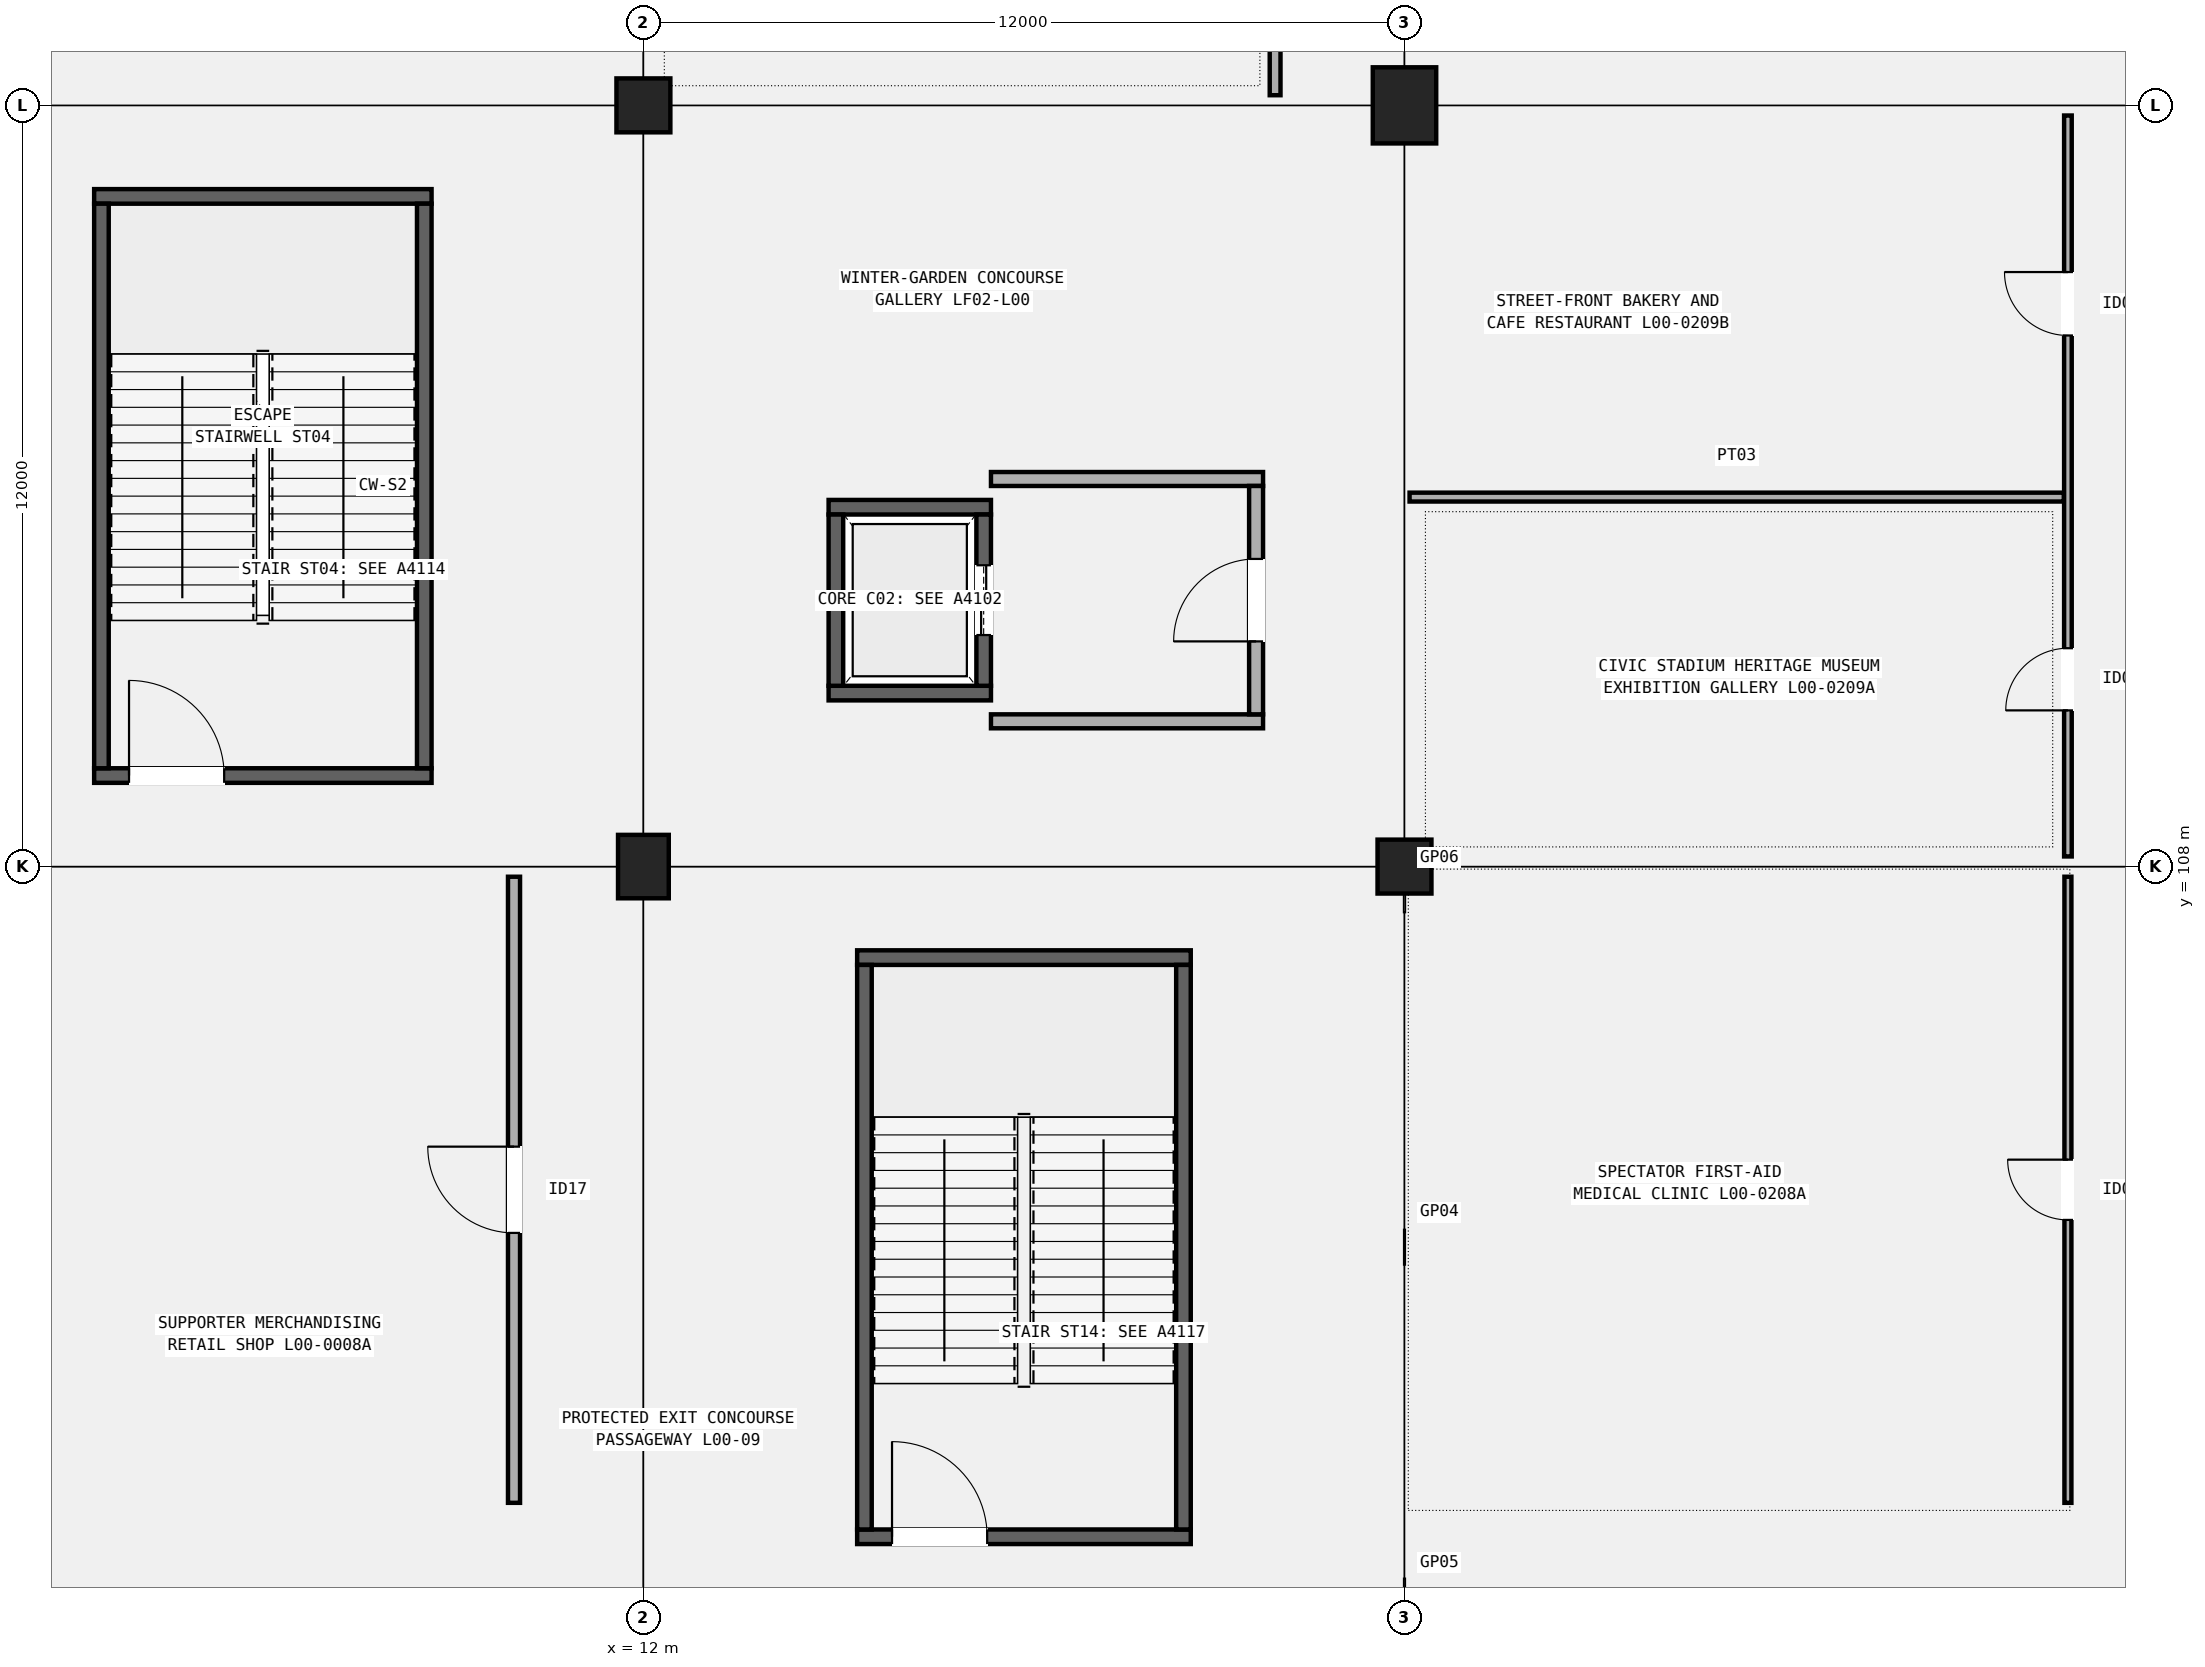
"""IFC4 building model, lengths in metres.
Left out: names, types, materials, properties, quantities, classifications, styles, units other than length and angle.
Written with IfcOpenShell. Run it as: python <this file> out.ifc"""

import sys

from ifc_helpers import new_model, si_unit, direction, frame, frame_2d, origin, origin_2d, place, context, subcontext, project, spatial, rectangle, circle, extrude, element, fill, save


model = new_model("IFC4")
c1 = context("Model", 3, precision=1e-05, world=origin(), true_north=direction((0.0, 1.0)))
c2 = subcontext(c1, "Body", "Model", "MODEL_VIEW")
j1 = project(units=[si_unit("LENGTHUNIT", "METRE"), si_unit("PLANEANGLEUNIT", "RADIAN")], contexts=[c1])
p1 = place(None, origin())
s1 = spatial("IfcSite", under=j1, at=p1, CompositionType="ELEMENT")
p2 = place(p1, origin())
s2 = spatial("IfcBuilding", under=s1, at=p2, CompositionType="ELEMENT")
p3 = place(p2, origin())
s3 = spatial("IfcBuildingStorey", under=s2, at=p3, CompositionType="ELEMENT", Elevation=0.0)
p4 = place(p3, frame((12.0, 108.0, 0.0), z_axis=(0.0, 0.0, 1.0), x_axis=(1.0, 0.0, 0.0)))
e1 = element("IfcColumn", 1, at=p4, inside=s3, PredefinedType="COLUMN", context=c2, shape_type="SweptSolid", body=[
    extrude(rectangle(XDim=0.8, YDim=1.0, at=origin_2d()), origin(), (0.0, 0.0, 1.0), 5.4),
])
for number, where, z_axis, x_axis in (
    (2, (12.0, 120.0, 0.0), (0.0, 0.0, 1.0), (1.0, 0.0, 0.0)),
    (3, (24.0, 108.0, 0.0), (0.0, 0.0, 1.0), (1.0, 0.0, 0.0)),
):
    element("IfcColumn", number, at=place(p3, frame(where, z_axis=z_axis, x_axis=x_axis)), inside=s3, PredefinedType="COLUMN", context=c2, shape_type="SweptSolid", body=[
        extrude(circle(Radius=0.425, at=origin_2d()), origin(), (0.0, 0.0, 1.0), 5.4),
    ])
p5 = place(p3, frame((24.0, 120.0, 0.0), z_axis=(0.0, 0.0, 1.0), x_axis=(1.0, 0.0, 0.0)))
e4 = element("IfcColumn", 4, at=p5, inside=s3, PredefinedType="COLUMN", context=c2, shape_type="SweptSolid", body=[
    extrude(rectangle(XDim=1.0, YDim=1.2, at=origin_2d()), origin(), (0.0, 0.0, 1.0), 5.4),
])
p6 = place(p3, frame((3.34, 109.435, 0.0), z_axis=(0.0, 0.0, 1.0), x_axis=(1.0, 0.0, 0.0)))
e5 = element("IfcWall", 5, at=p6, inside=s3, PredefinedType="SHEAR", context=c2, shape_type="SweptSolid", body=[
    extrude(rectangle(XDim=5.32, YDim=0.23, at=frame_2d((2.66, 0.0))), origin(), (0.0, 0.0, 1.0), 5.14),
])
p7 = place(p6, frame((0.55, 0.0, 0.0)))
e6 = element("IfcOpeningElement", 6, at=p7, cuts=e5, PredefinedType="OPENING", context=c2, shape_type="SweptSolid", body=[
    extrude(rectangle(XDim=1.5, YDim=2.2, at=frame_2d((0.75, 1.1))), frame((0.0, 0.125, 0.0), z_axis=(0.0, -1.0, 0.0), x_axis=(1.0, 0.0, 0.0)), (0.0, 0.0, 1.0), 0.25),
])
p8 = place(p3, frame((3.34, 118.565, 0.0), z_axis=(0.0, 0.0, 1.0), x_axis=(1.0, 0.0, 0.0)))
e7 = element("IfcWall", 7, at=p8, inside=s3, PredefinedType="SHEAR", context=c2, shape_type="SweptSolid", body=[
    extrude(rectangle(XDim=5.32, YDim=0.23, at=frame_2d((2.66, 0.0))), origin(), (0.0, 0.0, 1.0), 5.14),
])
for number, where, z_axis, x_axis in (
    (8, (3.455, 109.55, 0.0), (0.0, 0.0, 1.0), (0.0, 1.0, 0.0)),
    (9, (8.545, 109.55, 0.0), (0.0, 0.0, 1.0), (0.0, 1.0, 0.0)),
):
    element("IfcWall", number, at=place(p3, frame(where, z_axis=z_axis, x_axis=x_axis)), inside=s3, PredefinedType="SHEAR", context=c2, shape_type="SweptSolid", body=[
        extrude(rectangle(XDim=8.9, YDim=0.23, at=frame_2d((4.45, 0.0))), origin(), (0.0, 0.0, 1.0), 5.14),
    ])
p9 = place(p3, frame((15.37, 97.435, 0.0), z_axis=(0.0, 0.0, 1.0), x_axis=(1.0, 0.0, 0.0)))
e10 = element("IfcWall", 10, at=p9, inside=s3, PredefinedType="SHEAR", context=c2, shape_type="SweptSolid", body=[
    extrude(rectangle(XDim=5.26, YDim=0.23, at=frame_2d((2.63, 0.0))), origin(), (0.0, 0.0, 1.0), 5.14),
])
p10 = place(p9, frame((0.55, 0.0, 0.0)))
e11 = element("IfcOpeningElement", 11, at=p10, cuts=e10, PredefinedType="OPENING", context=c2, shape_type="SweptSolid", body=[
    extrude(rectangle(XDim=1.5, YDim=2.2, at=frame_2d((0.75, 1.1))), frame((0.0, 0.125, 0.0), z_axis=(0.0, -1.0, 0.0), x_axis=(1.0, 0.0, 0.0)), (0.0, 0.0, 1.0), 0.25),
])
p11 = place(p3, frame((15.37, 106.565, 0.0), z_axis=(0.0, 0.0, 1.0), x_axis=(1.0, 0.0, 0.0)))
e12 = element("IfcWall", 12, at=p11, inside=s3, PredefinedType="SHEAR", context=c2, shape_type="SweptSolid", body=[
    extrude(rectangle(XDim=5.26, YDim=0.23, at=frame_2d((2.63, 0.0))), origin(), (0.0, 0.0, 1.0), 5.14),
])
for number, where, z_axis, x_axis in (
    (13, (15.485, 97.55, 0.0), (0.0, 0.0, 1.0), (0.0, 1.0, 0.0)),
    (14, (20.515, 97.55, 0.0), (0.0, 0.0, 1.0), (0.0, 1.0, 0.0)),
):
    element("IfcWall", number, at=place(p3, frame(where, z_axis=z_axis, x_axis=x_axis)), inside=s3, PredefinedType="SHEAR", context=c2, shape_type="SweptSolid", body=[
        extrude(rectangle(XDim=8.9, YDim=0.23, at=frame_2d((4.45, 0.0))), origin(), (0.0, 0.0, 1.0), 5.14),
    ])
for number, where, z_axis, x_axis in (
    (15, (14.92, 110.735, 0.0), (0.0, 0.0, 1.0), (1.0, 0.0, 0.0)),
    (16, (14.92, 113.665, 0.0), (0.0, 0.0, 1.0), (1.0, 0.0, 0.0)),
):
    element("IfcWall", number, at=place(p3, frame(where, z_axis=z_axis, x_axis=x_axis)), inside=s3, PredefinedType="SHEAR", context=c2, shape_type="SweptSolid", body=[
        extrude(rectangle(XDim=2.56, YDim=0.23, at=frame_2d((1.28, 0.0))), origin(), (0.0, 0.0, 1.0), 5.14),
    ])
p12 = place(p3, frame((15.035, 110.85, 0.0), z_axis=(0.0, 0.0, 1.0), x_axis=(0.0, 1.0, 0.0)))
e17 = element("IfcWall", 17, at=p12, inside=s3, PredefinedType="SHEAR", context=c2, shape_type="SweptSolid", body=[
    extrude(rectangle(XDim=2.7, YDim=0.23, at=frame_2d((1.35, 0.0))), origin(), (0.0, 0.0, 1.0), 5.14),
])
p13 = place(p3, frame((17.365, 110.85, 0.0), z_axis=(0.0, 0.0, 1.0), x_axis=(0.0, 1.0, 0.0)))
e18 = element("IfcWall", 18, at=p13, inside=s3, PredefinedType="SHEAR", context=c2, shape_type="SweptSolid", body=[
    extrude(rectangle(XDim=2.7, YDim=0.23, at=frame_2d((1.35, 0.0))), origin(), (0.0, 0.0, 1.0), 5.14),
])
p14 = place(p13, frame((0.8, 0.0, 0.0)))
e19 = element("IfcOpeningElement", 19, at=p14, cuts=e18, PredefinedType="OPENING", context=c2, shape_type="SweptSolid", body=[
    extrude(rectangle(XDim=1.1, YDim=2.15, at=frame_2d((0.55, 1.075))), frame((0.0, 0.125, 0.0), z_axis=(0.0, -1.0, 0.0), x_axis=(1.0, 0.0, 0.0)), (0.0, 0.0, 1.0), 0.25),
])
for number, where, z_axis, x_axis in (
    (20, (17.48, 110.29, 0.0), (0.0, 0.0, 1.0), (1.0, 0.0, 0.0)),
    (21, (17.48, 114.11, 0.0), (0.0, 0.0, 1.0), (1.0, 0.0, 0.0)),
):
    element("IfcWall", number, at=place(p3, frame(where, z_axis=z_axis, x_axis=x_axis)), inside=s3, PredefinedType="SOLIDWALL", context=c2, shape_type="SweptSolid", body=[
        extrude(rectangle(XDim=4.29, YDim=0.22, at=frame_2d((2.145, 0.0))), origin(), (0.0, 0.0, 1.0), 4.52),
    ])
p15 = place(p3, frame((21.66, 110.4, 0.0), z_axis=(0.0, 0.0, 1.0), x_axis=(0.0, 1.0, 0.0)))
e22 = element("IfcWall", 22, at=p15, inside=s3, PredefinedType="SOLIDWALL", context=c2, shape_type="SweptSolid", body=[
    extrude(rectangle(XDim=3.6, YDim=0.22, at=frame_2d((1.8, 0.0))), origin(), (0.0, 0.0, 1.0), 4.52),
])
p16 = place(p15, frame((1.15, 0.0, 0.0)))
e23 = element("IfcOpeningElement", 23, at=p16, cuts=e22, PredefinedType="OPENING", context=c2, shape_type="SweptSolid", body=[
    extrude(rectangle(XDim=1.3, YDim=2.15, at=frame_2d((0.65, 1.075))), frame((0.0, 0.12, 0.0), z_axis=(0.0, -1.0, 0.0), x_axis=(1.0, 0.0, 0.0)), (0.0, 0.0, 1.0), 0.24),
])
p17 = place(p3, frame((9.96, 97.97, 0.0), z_axis=(0.0, 0.0, 1.0), x_axis=(0.0, 1.0, 0.0)))
e24 = element("IfcWall", 24, at=p17, inside=s3, PredefinedType="PARTITIONING", context=c2, shape_type="SweptSolid", body=[
    extrude(rectangle(XDim=9.87, YDim=0.19, at=frame_2d((4.935, 0.0))), origin(), (0.0, 0.0, 1.0), 4.52),
])
p18 = place(p17, frame((4.255, 0.0, 0.0)))
e25 = element("IfcOpeningElement", 25, at=p18, cuts=e24, PredefinedType="OPENING", context=c2, shape_type="SweptSolid", body=[
    extrude(rectangle(XDim=1.36, YDim=2.25, at=frame_2d((0.68, 1.125))), frame((0.0, 0.105, 0.0), z_axis=(0.0, -1.0, 0.0), x_axis=(1.0, 0.0, 0.0)), (0.0, 0.0, 1.0), 0.21),
])
p19 = place(p3, frame((21.96, 120.16, 0.0), z_axis=(0.0, 0.0, 1.0), x_axis=(0.0, 1.0, 0.0)))
e26 = element("IfcWall", 26, at=p19, inside=s3, PredefinedType="PARTITIONING", context=c2, shape_type="SweptSolid", body=[
    extrude(rectangle(XDim=11.68, YDim=0.17, at=frame_2d((5.84, 0.0))), origin(), (0.0, 0.0, 1.0), 4.52),
])
p20 = place(p19, frame((5.08, 0.0, 0.0)))
e27 = element("IfcOpeningElement", 27, at=p20, cuts=e26, PredefinedType="OPENING", context=c2, shape_type="SweptSolid", body=[
    extrude(rectangle(XDim=1.52, YDim=2.28, at=frame_2d((0.76, 1.14))), frame((0.0, 0.095, 0.0), z_axis=(0.0, -1.0, 0.0), x_axis=(1.0, 0.0, 0.0)), (0.0, 0.0, 1.0), 0.19),
])
p21 = place(p3, frame((34.46, 97.97, 0.0), z_axis=(0.0, 0.0, 1.0), x_axis=(0.0, 1.0, 0.0)))
e28 = element("IfcWall", 28, at=p21, inside=s3, PredefinedType="PARTITIONING", context=c2, shape_type="SweptSolid", body=[
    extrude(rectangle(XDim=9.87, YDim=0.11, at=frame_2d((4.935, 0.0))), origin(), (0.0, 0.0, 1.0), 4.52),
])
p22 = place(p21, frame((4.46, 0.0, 0.0)))
e29 = element("IfcOpeningElement", 29, at=p22, cuts=e28, PredefinedType="OPENING", context=c2, shape_type="SweptSolid", body=[
    extrude(rectangle(XDim=0.95, YDim=2.12, at=frame_2d((0.475, 1.06))), frame((0.0, 0.065, 0.0), z_axis=(0.0, -1.0, 0.0), x_axis=(1.0, 0.0, 0.0)), (0.0, 0.0, 1.0), 0.13),
])
p23 = place(p3, frame((34.46, 108.16, 0.0), z_axis=(0.0, 0.0, 1.0), x_axis=(0.0, 1.0, 0.0)))
e30 = element("IfcWall", 30, at=p23, inside=s3, PredefinedType="PARTITIONING", context=c2, shape_type="SweptSolid", body=[
    extrude(rectangle(XDim=11.68, YDim=0.12, at=frame_2d((5.84, 0.0))), origin(), (0.0, 0.0, 1.0), 4.52),
])
p24 = place(p23, frame((2.302, 0.0, 0.0)))
e31 = element("IfcOpeningElement", 31, at=p24, cuts=e30, PredefinedType="OPENING", context=c2, shape_type="SweptSolid", body=[
    extrude(rectangle(XDim=0.98, YDim=2.1, at=frame_2d((0.49, 1.05))), frame((0.0, 0.07, 0.0), z_axis=(0.0, -1.0, 0.0), x_axis=(1.0, 0.0, 0.0)), (0.0, 0.0, 1.0), 0.14),
])
p25 = place(p23, frame((8.212, 0.0, 0.0)))
e32 = element("IfcOpeningElement", 32, at=p25, cuts=e30, PredefinedType="OPENING", context=c2, shape_type="SweptSolid", body=[
    extrude(rectangle(XDim=1.0, YDim=2.14, at=frame_2d((0.5, 1.07))), frame((0.0, 0.07, 0.0), z_axis=(0.0, -1.0, 0.0), x_axis=(1.0, 0.0, 0.0)), (0.0, 0.0, 1.0), 0.14),
])
p26 = place(p3, frame((24.08, 113.825, 0.0), z_axis=(0.0, 0.0, 1.0), x_axis=(1.0, 0.0, 0.0)))
e33 = element("IfcWall", 33, at=p26, inside=s3, PredefinedType="PARTITIONING", context=c2, shape_type="SweptSolid", body=[
    extrude(rectangle(XDim=10.315, YDim=0.14, at=frame_2d((5.157, 0.0))), origin(), (0.0, 0.0, 1.0), 4.52),
])
p27 = place(p7, origin())
e34 = element("IfcDoor", 34, at=p27, inside=s3, OperationType="SINGLE_SWING_LEFT", PredefinedType="DOOR", context=c2, shape_type="SweptSolid", body=[
    extrude(rectangle(XDim=1.5, YDim=2.2, at=frame_2d((0.75, 1.1))), frame((0.0, 0.025, 0.0), z_axis=(0.0, -1.0, 0.0), x_axis=(1.0, 0.0, 0.0)), (0.0, 0.0, 1.0), 0.05),
])
fill(e6, e34)
p28 = place(p10, origin())
e35 = element("IfcDoor", 35, at=p28, inside=s3, OperationType="SINGLE_SWING_LEFT", PredefinedType="DOOR", context=c2, shape_type="SweptSolid", body=[
    extrude(rectangle(XDim=1.5, YDim=2.2, at=frame_2d((0.75, 1.1))), frame((0.0, 0.025, 0.0), z_axis=(0.0, -1.0, 0.0), x_axis=(1.0, 0.0, 0.0)), (0.0, 0.0, 1.0), 0.05),
])
fill(e11, e35)
p29 = place(p14, origin())
e36 = element("IfcDoor", 36, at=p29, inside=s3, OperationType="DOUBLE_DOOR_SLIDING", PredefinedType="DOOR", context=c2, shape_type="SweptSolid", body=[
    extrude(rectangle(XDim=1.1, YDim=2.15, at=frame_2d((0.55, 1.075))), frame((0.0, 0.025, 0.0), z_axis=(0.0, -1.0, 0.0), x_axis=(1.0, 0.0, 0.0)), (0.0, 0.0, 1.0), 0.05),
])
fill(e19, e36)
p30 = place(p16, origin())
e37 = element("IfcDoor", 37, at=p30, inside=s3, OperationType="SINGLE_SWING_LEFT", PredefinedType="DOOR", context=c2, shape_type="SweptSolid", body=[
    extrude(rectangle(XDim=1.3, YDim=2.15, at=frame_2d((0.65, 1.075))), frame((0.0, 0.025, 0.0), z_axis=(0.0, -1.0, 0.0), x_axis=(1.0, 0.0, 0.0)), (0.0, 0.0, 1.0), 0.05),
])
fill(e23, e37)
p31 = place(p18, origin())
e38 = element("IfcDoor", 38, at=p31, inside=s3, OperationType="SINGLE_SWING_RIGHT", PredefinedType="DOOR", context=c2, shape_type="SweptSolid", body=[
    extrude(rectangle(XDim=1.36, YDim=2.25, at=frame_2d((0.68, 1.125))), frame((0.0, 0.025, 0.0), z_axis=(0.0, -1.0, 0.0), x_axis=(1.0, 0.0, 0.0)), (0.0, 0.0, 1.0), 0.05),
])
fill(e25, e38)
p32 = place(p22, origin())
e39 = element("IfcDoor", 39, at=p32, inside=s3, OperationType="SINGLE_SWING_RIGHT", PredefinedType="DOOR", context=c2, shape_type="SweptSolid", body=[
    extrude(rectangle(XDim=0.95, YDim=2.12, at=frame_2d((0.475, 1.06))), frame((0.0, 0.025, 0.0), z_axis=(0.0, -1.0, 0.0), x_axis=(1.0, 0.0, 0.0)), (0.0, 0.0, 1.0), 0.05),
])
fill(e29, e39)
p33 = place(p24, origin())
e40 = element("IfcDoor", 40, at=p33, inside=s3, OperationType="SINGLE_SWING_LEFT", PredefinedType="DOOR", context=c2, shape_type="SweptSolid", body=[
    extrude(rectangle(XDim=0.98, YDim=2.1, at=frame_2d((0.49, 1.05))), frame((0.0, 0.025, 0.0), z_axis=(0.0, -1.0, 0.0), x_axis=(1.0, 0.0, 0.0)), (0.0, 0.0, 1.0), 0.05),
])
fill(e31, e40)
p34 = place(p25, origin())
e41 = element("IfcDoor", 41, at=p34, inside=s3, OperationType="SINGLE_SWING_RIGHT", PredefinedType="DOOR", context=c2, shape_type="SweptSolid", body=[
    extrude(rectangle(XDim=1.0, YDim=2.14, at=frame_2d((0.5, 1.07))), frame((0.0, 0.025, 0.0), z_axis=(0.0, -1.0, 0.0), x_axis=(1.0, 0.0, 0.0)), (0.0, 0.0, 1.0), 0.05),
])
fill(e32, e41)
save(model, sys.argv[1])
